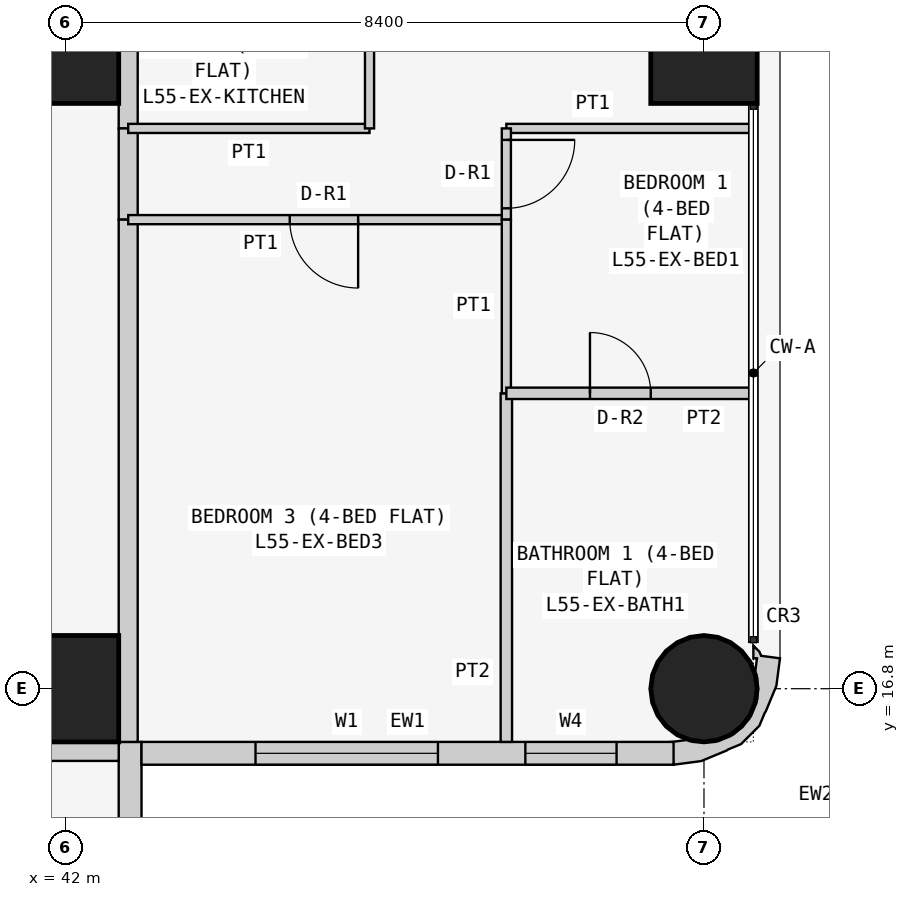
"""IFC4 building model, lengths in metres.
Left out: names, types, materials, properties, quantities, classifications, styles, units other than length and angle.
Written with IfcOpenShell. Run it as: python <this file> out.ifc"""

import sys

from ifc_helpers import new_model, si_unit, direction, frame, frame_2d, origin, origin_2d, place, context, subcontext, project, spatial, polyline, rectangle, circle, outline, extrude, element, fill, save


model = new_model("IFC4")
c1 = context("Model", 3, precision=1e-05, world=origin(), true_north=direction((0.0, 1.0)))
c2 = subcontext(c1, "Body", "Model", "MODEL_VIEW")
j1 = project(units=[si_unit("LENGTHUNIT", "METRE"), si_unit("PLANEANGLEUNIT", "RADIAN")], contexts=[c1])
p1 = place(None, origin())
s1 = spatial("IfcSite", under=j1, at=p1, CompositionType="ELEMENT")
p2 = place(p1, origin())
s2 = spatial("IfcBuilding", under=s1, at=p2, CompositionType="ELEMENT")
p3 = place(p2, frame((0.0, 0.0, 212.1)))
s3 = spatial("IfcBuildingStorey", under=s2, at=p3, CompositionType="ELEMENT", Elevation=212.1)
for number, where, z_axis, x_axis in (
    (1, (42.0, 16.8, 0.0), (0.0, 0.0, 1.0), (1.0, 0.0, 0.0)),
    (2, (42.0, 25.2, 0.0), (0.0, 0.0, 1.0), (1.0, 0.0, 0.0)),
):
    element("IfcColumn", number, at=place(p3, frame(where, z_axis=z_axis, x_axis=x_axis)), inside=s3, PredefinedType="COLUMN", context=c2, shape_type="SweptSolid", body=[
        extrude(rectangle(XDim=1.4, YDim=1.4, at=origin_2d()), origin(), (0.0, 0.0, 1.0), 3.6),
    ])
p4 = place(p3, frame((50.4, 16.8, 0.0), z_axis=(0.0, 0.0, 1.0), x_axis=(1.0, 0.0, 0.0)))
e3 = element("IfcColumn", 3, at=p4, inside=s3, PredefinedType="COLUMN", context=c2, shape_type="SweptSolid", body=[
    extrude(circle(Radius=0.7, at=origin_2d()), origin(), (0.0, 0.0, 1.0), 3.6),
])
p5 = place(p3, frame((50.4, 25.2, 0.0), z_axis=(0.0, 0.0, 1.0), x_axis=(1.0, 0.0, 0.0)))
e4 = element("IfcColumn", 4, at=p5, inside=s3, PredefinedType="COLUMN", context=c2, shape_type="SweptSolid", body=[
    extrude(rectangle(XDim=1.4, YDim=1.4, at=origin_2d()), origin(), (0.0, 0.0, 1.0), 3.6),
])
p6 = place(p3, frame((42.85, 8.8, 0.0), z_axis=(0.0, 0.0, 1.0), x_axis=(0.0, 1.0, 0.0)))
e5 = element("IfcWall", 5, at=p6, inside=s3, PredefinedType="SOLIDWALL", context=c2, shape_type="SweptSolid", body=[
    extrude(rectangle(XDim=7.3, YDim=0.3, at=frame_2d((3.65, 0.0))), origin(), (0.0, 0.0, 1.0), 3.45),
])
p7 = place(p6, frame((3.1, 0.0, 0.9)))
e6 = element("IfcOpeningElement", 6, at=p7, cuts=e5, PredefinedType="OPENING", context=c2, shape_type="SweptSolid", body=[
    extrude(rectangle(XDim=2.4, YDim=1.5, at=frame_2d((1.2, 0.75))), frame((0.0, 0.16, 0.0), z_axis=(0.0, -1.0, 0.0), x_axis=(1.0, 0.0, 0.0)), (0.0, 0.0, 1.0), 0.32),
])
p8 = place(p6, frame((0.75, 0.0, 0.9)))
e7 = element("IfcOpeningElement", 7, at=p8, cuts=e5, PredefinedType="OPENING", context=c2, shape_type="SweptSolid", body=[
    extrude(rectangle(XDim=1.2, YDim=1.5, at=frame_2d((0.6, 0.75))), frame((0.0, 0.16, 0.0), z_axis=(0.0, -1.0, 0.0), x_axis=(1.0, 0.0, 0.0)), (0.0, 0.0, 1.0), 0.32),
])
p9 = place(p3, frame((43.0, 15.95, 0.0), z_axis=(0.0, 0.0, 1.0), x_axis=(1.0, 0.0, 0.0)))
e8 = element("IfcWall", 8, at=p9, inside=s3, PredefinedType="SOLIDWALL", context=c2, shape_type="SweptSolid", body=[
    extrude(rectangle(XDim=7.0, YDim=0.3, at=frame_2d((3.5, 0.0))), origin(), (0.0, 0.0, 1.0), 3.45),
])
p10 = place(p9, frame((1.5, 0.0, 0.9)))
e9 = element("IfcOpeningElement", 9, at=p10, cuts=e8, PredefinedType="OPENING", context=c2, shape_type="SweptSolid", body=[
    extrude(rectangle(XDim=2.4, YDim=1.5, at=frame_2d((1.2, 0.75))), frame((0.0, 0.16, 0.0), z_axis=(0.0, -1.0, 0.0), x_axis=(1.0, 0.0, 0.0)), (0.0, 0.0, 1.0), 0.32),
])
p11 = place(p9, frame((5.05, 0.0, 0.9)))
e10 = element("IfcOpeningElement", 10, at=p11, cuts=e8, PredefinedType="OPENING", context=c2, shape_type="SweptSolid", body=[
    extrude(rectangle(XDim=1.2, YDim=1.5, at=frame_2d((0.6, 0.75))), frame((0.0, 0.16, 0.0), z_axis=(0.0, -1.0, 0.0), x_axis=(1.0, 0.0, 0.0)), (0.0, 0.0, 1.0), 0.32),
])
p12 = place(p3, frame((50.11, 16.076, 0.0), z_axis=(0.0, 0.0, 1.0), x_axis=(0.898030234854, -0.439933741929, 0.0)))
e11 = element("IfcWall", 11, at=p12, inside=s3, PredefinedType="SOLIDWALL", context=c2, shape_type="SweptSolid", body=[
    extrude(outline(polyline([(0.664, 1.577), (0.426, 1.497), (0.382, 1.536), (0.276, 1.572), (0.349, 1.423), (0.392, 1.444), (0.453, 1.261), (0.51, 1.211), (0.632, 0.961), (0.65, 0.683), (0.56, 0.419), (0.375, 0.21), (0.125, 0.087), (0.05, 0.082), (-0.128, -0.035), (-0.145, -0.044), (0.022, -0.296), (0.327, -0.094), (0.568, 0.18), (0.577, 0.199), (0.7, 0.337), (0.811, 0.661), (0.799, 0.846), (0.803, 0.866), (0.78, 1.231), (0.664, 1.577)])), origin(), (0.0, 0.0, 1.0), 3.45),
])
p13 = place(p3, frame((42.825, 26.8, 0.0), z_axis=(0.0, 0.0, 1.0), x_axis=(0.0, -1.0, 0.0)))
e12 = element("IfcWall", 12, at=p13, inside=s3, PredefinedType="PARTITIONING", context=c2, shape_type="SweptSolid", body=[
    extrude(rectangle(XDim=2.629, YDim=0.25, at=frame_2d((1.314, 0.0))), origin(), (0.0, 0.0, 1.0), 3.45),
])
p14 = place(p3, frame((42.825, 24.171, 0.0), z_axis=(0.0, 0.0, 1.0), x_axis=(0.0, -1.0, 0.0)))
e13 = element("IfcWall", 13, at=p14, inside=s3, PredefinedType="PARTITIONING", context=c2, shape_type="SweptSolid", body=[
    extrude(rectangle(XDim=1.2, YDim=0.25, at=frame_2d((0.6, 0.0))), origin(), (0.0, 0.0, 1.0), 3.45),
])
for number, where, z_axis, x_axis in (
    (14, (42.825, 22.971, 0.0), (0.0, 0.0, 1.0), (0.0, -1.0, 0.0)),
    (15, (42.7, 15.975, 0.0), (0.0, 0.0, 1.0), (-1.0, 0.0, 0.0)),
):
    element("IfcWall", number, at=place(p3, frame(where, z_axis=z_axis, x_axis=x_axis)), inside=s3, PredefinedType="PARTITIONING", context=c2, shape_type="SweptSolid", body=[
        extrude(rectangle(XDim=6.871, YDim=0.25, at=frame_2d((3.436, 0.0))), origin(), (0.0, 0.0, 1.0), 3.45),
    ])
p15 = place(p3, frame((42.825, 24.171, 0.0), z_axis=(0.0, 0.0, 1.0), x_axis=(1.0, 0.0, 0.0)))
e16 = element("IfcWall", 16, at=p15, inside=s3, PredefinedType="PARTITIONING", context=c2, shape_type="SweptSolid", body=[
    extrude(rectangle(XDim=3.175, YDim=0.12, at=frame_2d((1.587, 0.0))), origin(), (0.0, 0.0, 1.0), 3.45),
])
p16 = place(p3, frame((46.0, 24.171, 0.0), z_axis=(0.0, 0.0, 1.0), x_axis=(0.0, 1.0, 0.0)))
e17 = element("IfcWall", 17, at=p16, inside=s3, PredefinedType="PARTITIONING", context=c2, shape_type="SweptSolid", body=[
    extrude(rectangle(XDim=2.629, YDim=0.12, at=frame_2d((1.314, 0.0))), origin(), (0.0, 0.0, 1.0), 3.45),
])
p17 = place(p3, frame((47.8, 22.971, 0.0), z_axis=(0.0, 0.0, 1.0), x_axis=(-1.0, 0.0, 0.0)))
e18 = element("IfcWall", 18, at=p17, inside=s3, PredefinedType="PARTITIONING", context=c2, shape_type="SweptSolid", body=[
    extrude(rectangle(XDim=4.975, YDim=0.12, at=frame_2d((2.488, 0.0))), origin(), (0.0, 0.0, 1.0), 3.45),
])
p18 = place(p17, frame((1.95, 0.0, 0.0)))
e19 = element("IfcOpeningElement", 19, at=p18, cuts=e18, PredefinedType="OPENING", context=c2, shape_type="SweptSolid", body=[
    extrude(rectangle(XDim=0.9, YDim=2.1, at=frame_2d((0.45, 1.05))), frame((0.0, 0.07, 0.0), z_axis=(0.0, -1.0, 0.0), x_axis=(1.0, 0.0, 0.0)), (0.0, 0.0, 1.0), 0.14),
])
p19 = place(p3, frame((51.05, 24.171, 0.0), z_axis=(0.0, 0.0, 1.0), x_axis=(-1.0, 0.0, 0.0)))
e20 = element("IfcWall", 20, at=p19, inside=s3, PredefinedType="PARTITIONING", context=c2, shape_type="SweptSolid", body=[
    extrude(rectangle(XDim=3.25, YDim=0.12, at=frame_2d((1.625, 0.0))), origin(), (0.0, 0.0, 1.0), 3.45),
])
p20 = place(p3, frame((47.8, 24.171, 0.0), z_axis=(0.0, 0.0, 1.0), x_axis=(0.0, -1.0, 0.0)))
e21 = element("IfcWall", 21, at=p20, inside=s3, PredefinedType="PARTITIONING", context=c2, shape_type="SweptSolid", body=[
    extrude(rectangle(XDim=1.2, YDim=0.12, at=frame_2d((0.6, 0.0))), origin(), (0.0, 0.0, 1.0), 3.45),
])
p21 = place(p20, frame((0.151, 0.0, 0.0)))
e22 = element("IfcOpeningElement", 22, at=p21, cuts=e21, PredefinedType="OPENING", context=c2, shape_type="SweptSolid", body=[
    extrude(rectangle(XDim=0.9, YDim=2.1, at=frame_2d((0.45, 1.05))), frame((0.0, 0.07, 0.0), z_axis=(0.0, -1.0, 0.0), x_axis=(1.0, 0.0, 0.0)), (0.0, 0.0, 1.0), 0.14),
])
p22 = place(p3, frame((47.8, 16.1, 0.0), z_axis=(0.0, 0.0, 1.0), x_axis=(0.0, 1.0, 0.0)))
e23 = element("IfcWall", 23, at=p22, inside=s3, PredefinedType="PARTITIONING", context=c2, shape_type="SweptSolid", body=[
    extrude(rectangle(XDim=4.586, YDim=0.15, at=frame_2d((2.293, 0.0))), origin(), (0.0, 0.0, 1.0), 3.45),
])
p23 = place(p3, frame((47.8, 20.686, 0.0), z_axis=(0.0, 0.0, 1.0), x_axis=(0.0, 1.0, 0.0)))
e24 = element("IfcWall", 24, at=p23, inside=s3, PredefinedType="PARTITIONING", context=c2, shape_type="SweptSolid", body=[
    extrude(rectangle(XDim=2.285, YDim=0.12, at=frame_2d((1.143, 0.0))), origin(), (0.0, 0.0, 1.0), 3.45),
])
p24 = place(p3, frame((51.05, 20.686, 0.0), z_axis=(0.0, 0.0, 1.0), x_axis=(-1.0, 0.0, 0.0)))
e25 = element("IfcWall", 25, at=p24, inside=s3, PredefinedType="PARTITIONING", context=c2, shape_type="SweptSolid", body=[
    extrude(rectangle(XDim=3.25, YDim=0.15, at=frame_2d((1.625, 0.0))), origin(), (0.0, 0.0, 1.0), 3.45),
])
p25 = place(p24, frame((1.35, 0.0, 0.0)))
e26 = element("IfcOpeningElement", 26, at=p25, cuts=e25, PredefinedType="OPENING", context=c2, shape_type="SweptSolid", body=[
    extrude(rectangle(XDim=0.8, YDim=2.1, at=frame_2d((0.4, 1.05))), frame((0.0, 0.085, 0.0), z_axis=(0.0, -1.0, 0.0), x_axis=(1.0, 0.0, 0.0)), (0.0, 0.0, 1.0), 0.17),
])
p26 = place(p10, origin())
e27 = element("IfcWindow", 27, at=p26, inside=s3, PartitioningType="SINGLE_PANEL", PredefinedType="WINDOW", context=c2, shape_type="SweptSolid", body=[
    extrude(rectangle(XDim=2.4, YDim=1.5, at=frame_2d((1.2, 0.75))), frame((0.0, 0.03, 0.0), z_axis=(0.0, -1.0, 0.0), x_axis=(1.0, 0.0, 0.0)), (0.0, 0.0, 1.0), 0.06),
])
fill(e9, e27)
p27 = place(p11, origin())
e28 = element("IfcWindow", 28, at=p27, inside=s3, PartitioningType="SINGLE_PANEL", PredefinedType="WINDOW", context=c2, shape_type="SweptSolid", body=[
    extrude(rectangle(XDim=1.2, YDim=1.5, at=frame_2d((0.6, 0.75))), frame((0.0, 0.03, 0.0), z_axis=(0.0, -1.0, 0.0), x_axis=(1.0, 0.0, 0.0)), (0.0, 0.0, 1.0), 0.06),
])
fill(e10, e28)
p28 = place(p18, origin())
e29 = element("IfcDoor", 29, at=p28, inside=s3, OperationType="SINGLE_SWING_LEFT", PredefinedType="DOOR", context=c2, shape_type="SweptSolid", body=[
    extrude(rectangle(XDim=0.9, YDim=2.1, at=frame_2d((0.45, 1.05))), frame((0.0, 0.025, 0.0), z_axis=(0.0, -1.0, 0.0), x_axis=(1.0, 0.0, 0.0)), (0.0, 0.0, 1.0), 0.05),
])
fill(e19, e29)
p29 = place(p21, origin())
e30 = element("IfcDoor", 30, at=p29, inside=s3, OperationType="SINGLE_SWING_LEFT", PredefinedType="DOOR", context=c2, shape_type="SweptSolid", body=[
    extrude(rectangle(XDim=0.9, YDim=2.1, at=frame_2d((0.45, 1.05))), frame((0.0, 0.025, 0.0), z_axis=(0.0, -1.0, 0.0), x_axis=(1.0, 0.0, 0.0)), (0.0, 0.0, 1.0), 0.05),
])
fill(e22, e30)
p30 = place(p25, frame((0.8, 0.0, 0.0), z_axis=(0.0, 0.0, 1.0), x_axis=(-1.0, 0.0, 0.0)))
e31 = element("IfcDoor", 31, at=p30, inside=s3, OperationType="SINGLE_SWING_LEFT", PredefinedType="DOOR", context=c2, shape_type="SweptSolid", body=[
    extrude(rectangle(XDim=0.8, YDim=2.1, at=frame_2d((0.4, 1.05))), frame((0.0, 0.025, 0.0), z_axis=(0.0, -1.0, 0.0), x_axis=(1.0, 0.0, 0.0)), (0.0, 0.0, 1.0), 0.05),
])
fill(e26, e31)
save(model, sys.argv[1])
